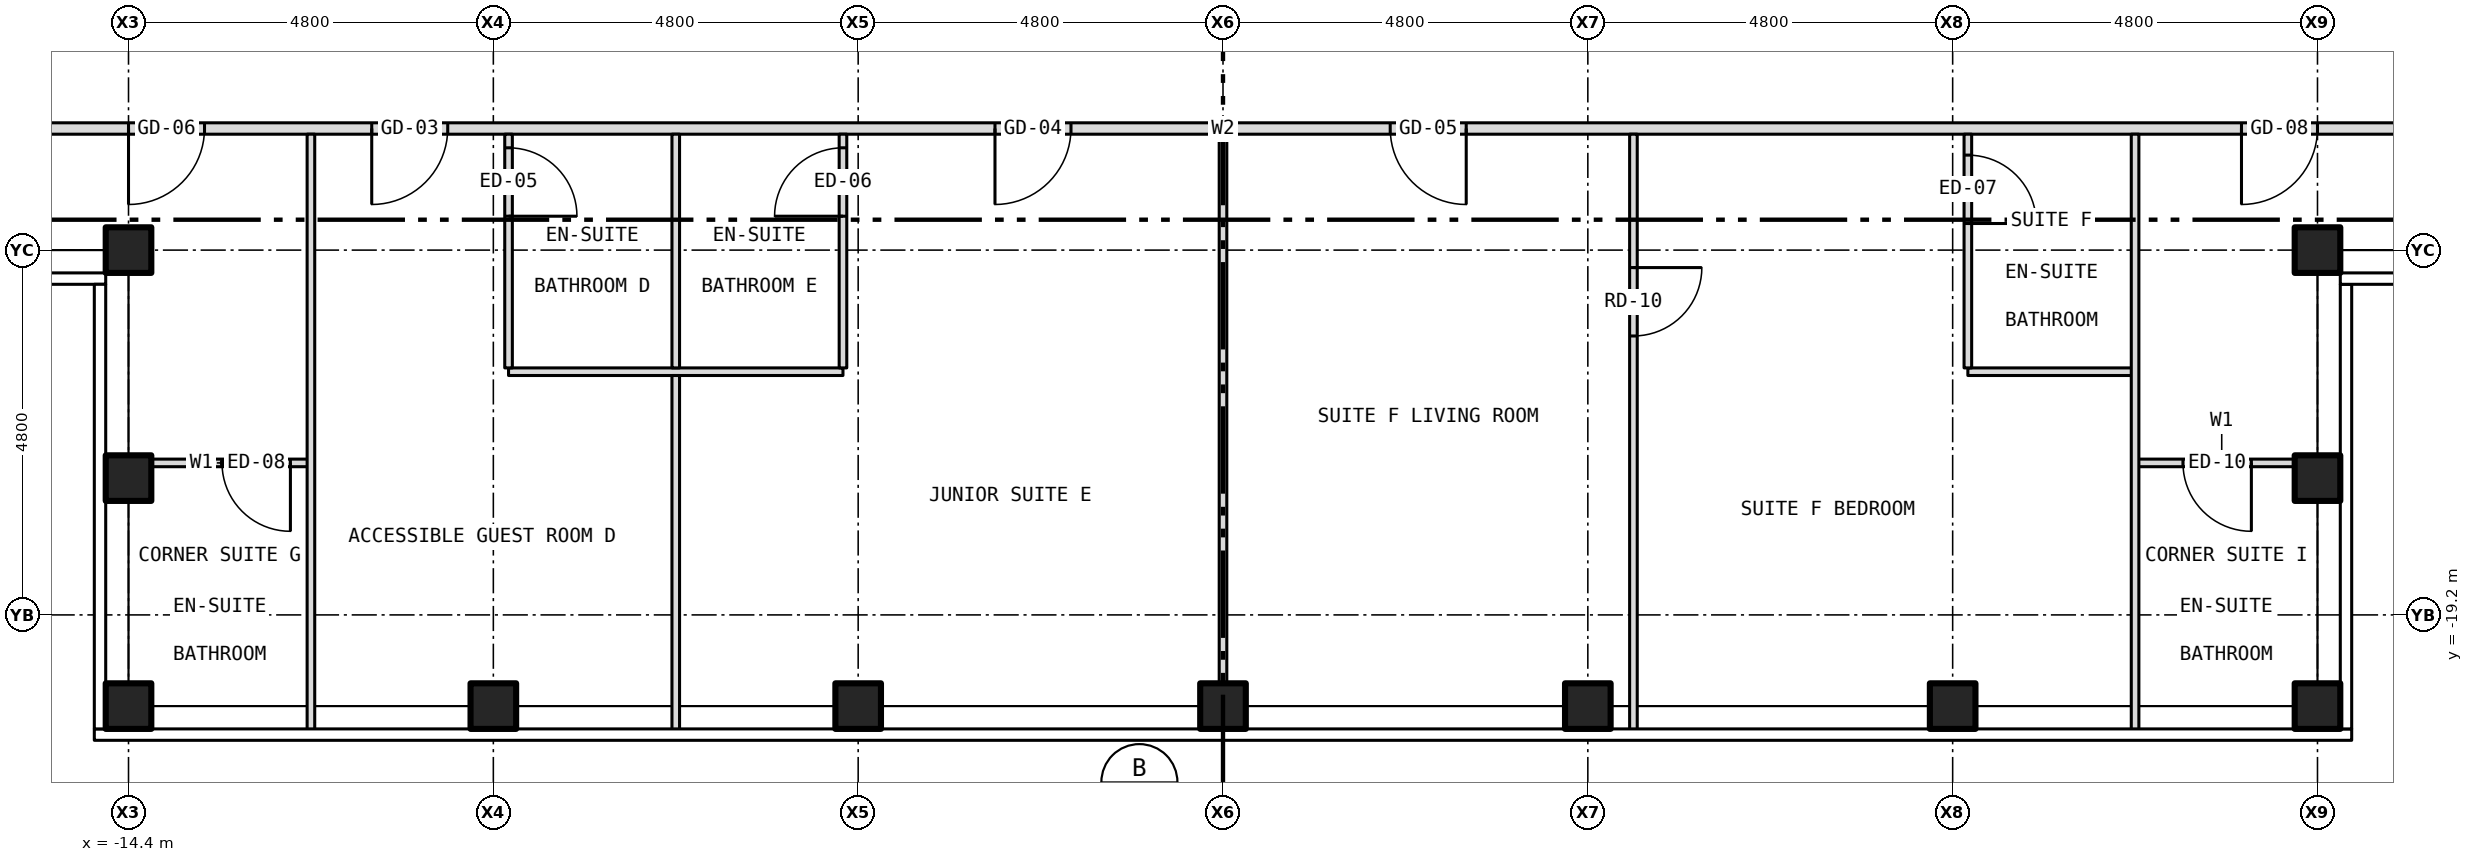
"""IFC4 building model, lengths in metres.
Left out: names, types, materials, properties, quantities, classifications, styles, units other than length and angle.
Written with IfcOpenShell. Run it as: python <this file> out.ifc"""

import sys

from ifc_helpers import new_model, si_unit, direction, frame, frame_2d, origin, origin_2d, place, context, subcontext, project, spatial, rectangle, hollow_rectangle, extrude, element, fill, save


model = new_model("IFC4")
c1 = context("Model", 3, precision=1e-05, world=origin(), true_north=direction((0.0, 1.0)))
c2 = subcontext(c1, "Body", "Model", "MODEL_VIEW")
j1 = project(units=[si_unit("LENGTHUNIT", "METRE"), si_unit("PLANEANGLEUNIT", "RADIAN")], contexts=[c1])
p1 = place(None, origin())
s1 = spatial("IfcSite", under=j1, at=p1, CompositionType="ELEMENT")
p2 = place(p1, origin())
s2 = spatial("IfcBuilding", under=s1, at=p2, CompositionType="ELEMENT")
p3 = place(p2, frame((0.0, 0.0, 244.5)))
s3 = spatial("IfcBuildingStorey", under=s2, at=p3, CompositionType="ELEMENT", Elevation=244.5)
for number, where, z_axis, x_axis in (
    (1, (-14.4, -20.4, -0.15), (0.0, 0.0, 1.0), (1.0, 0.0, 0.0)),
    (2, (-9.6, -20.4, -0.15), (0.0, 0.0, 1.0), (1.0, 0.0, 0.0)),
    (3, (-4.8, -20.4, -0.15), (0.0, 0.0, 1.0), (1.0, 0.0, 0.0)),
    (4, (0.0, -20.4, -0.15), (0.0, 0.0, 1.0), (1.0, 0.0, 0.0)),
    (5, (4.8, -20.4, -0.15), (0.0, 0.0, 1.0), (1.0, 0.0, 0.0)),
    (6, (9.6, -20.4, -0.15), (0.0, 0.0, 1.0), (1.0, 0.0, 0.0)),
    (7, (14.4, -20.4, -0.15), (0.0, 0.0, 1.0), (1.0, 0.0, 0.0)),
    (8, (-14.4, -14.4, -0.15), (0.0, 0.0, 1.0), (1.0, 0.0, 0.0)),
    (9, (-14.4, -17.4, -0.15), (0.0, 0.0, 1.0), (1.0, 0.0, 0.0)),
    (10, (14.4, -14.4, -0.15), (0.0, 0.0, 1.0), (1.0, 0.0, 0.0)),
    (11, (14.4, -17.4, -0.15), (0.0, 0.0, 1.0), (1.0, 0.0, 0.0)),
):
    element("IfcColumn", number, at=place(p3, frame(where, z_axis=z_axis, x_axis=x_axis)), inside=s3, PredefinedType="COLUMN", context=c2, shape_type="SweptSolid", body=[
        extrude(hollow_rectangle(XDim=0.6, YDim=0.6, WallThickness=0.03, at=origin_2d()), origin(), (0.0, 0.0, 1.0), 3.5),
    ])
p4 = place(p3, frame((-14.28, -17.2, 0.0), z_axis=(0.0, 0.0, 1.0), x_axis=(1.0, 0.0, 0.0)))
e12 = element("IfcWall", 12, at=p4, inside=s3, PredefinedType="PARTITIONING", context=c2, shape_type="SweptSolid", body=[
    extrude(rectangle(XDim=2.28, YDim=0.1, at=frame_2d((1.14, 0.0))), origin(), (0.0, 0.0, 1.0), 3.35),
])
p5 = place(p4, frame((1.11, 0.0, 0.0)))
e13 = element("IfcOpeningElement", 13, at=p5, cuts=e12, PredefinedType="OPENING", context=c2, shape_type="SweptSolid", body=[
    extrude(rectangle(XDim=0.9, YDim=2.1, at=frame_2d((0.45, 1.05))), frame((0.0, 0.062, 0.0), z_axis=(0.0, -1.0, 0.0), x_axis=(1.0, 0.0, 0.0)), (0.0, 0.0, 1.0), 0.124),
])
p6 = place(p3, frame((12.0, -17.2, 0.0), z_axis=(0.0, 0.0, 1.0), x_axis=(1.0, 0.0, 0.0)))
e14 = element("IfcWall", 14, at=p6, inside=s3, PredefinedType="PARTITIONING", context=c2, shape_type="SweptSolid", body=[
    extrude(rectangle(XDim=2.28, YDim=0.1, at=frame_2d((1.14, 0.0))), origin(), (0.0, 0.0, 1.0), 3.35),
])
p7 = place(p6, frame((0.63, 0.0, 0.0)))
e15 = element("IfcOpeningElement", 15, at=p7, cuts=e14, PredefinedType="OPENING", context=c2, shape_type="SweptSolid", body=[
    extrude(rectangle(XDim=0.9, YDim=2.1, at=frame_2d((0.45, 1.05))), frame((0.0, 0.062, 0.0), z_axis=(0.0, -1.0, 0.0), x_axis=(1.0, 0.0, 0.0)), (0.0, 0.0, 1.0), 0.124),
])
p8 = place(p3, frame((-9.4, -16.0, 0.0), z_axis=(0.0, 0.0, 1.0), x_axis=(1.0, 0.0, 0.0)))
e16 = element("IfcWall", 16, at=p8, inside=s3, PredefinedType="PARTITIONING", context=c2, shape_type="SweptSolid", body=[
    extrude(rectangle(XDim=4.4, YDim=0.1, at=frame_2d((2.2, 0.0))), origin(), (0.0, 0.0, 1.0), 3.35),
])
p9 = place(p3, frame((9.8, -16.0, 0.0), z_axis=(0.0, 0.0, 1.0), x_axis=(1.0, 0.0, 0.0)))
e17 = element("IfcWall", 17, at=p9, inside=s3, PredefinedType="PARTITIONING", context=c2, shape_type="SweptSolid", body=[
    extrude(rectangle(XDim=2.2, YDim=0.1, at=frame_2d((1.1, 0.0))), origin(), (0.0, 0.0, 1.0), 3.35),
])
p10 = place(p3, frame((-15.8, -12.8, 0.0), z_axis=(0.0, 0.0, 1.0), x_axis=(1.0, 0.0, 0.0)))
e18 = element("IfcWall", 18, at=p10, inside=s3, PredefinedType="PARTITIONING", context=c2, shape_type="SweptSolid", body=[
    extrude(rectangle(XDim=31.6, YDim=0.15, at=frame_2d((15.8, 0.0))), origin(), (0.0, 0.0, 1.0), 3.35),
])
p11 = place(p10, frame((4.6, 0.0, 0.0)))
e19 = element("IfcOpeningElement", 19, at=p11, cuts=e18, PredefinedType="OPENING", context=c2, shape_type="SweptSolid", body=[
    extrude(rectangle(XDim=1.0, YDim=2.1, at=frame_2d((0.5, 1.05))), frame((0.0, 0.087, 0.0), z_axis=(0.0, -1.0, 0.0), x_axis=(1.0, 0.0, 0.0)), (0.0, 0.0, 1.0), 0.174),
])
p12 = place(p10, frame((12.8, 0.0, 0.0)))
e20 = element("IfcOpeningElement", 20, at=p12, cuts=e18, PredefinedType="OPENING", context=c2, shape_type="SweptSolid", body=[
    extrude(rectangle(XDim=1.0, YDim=2.1, at=frame_2d((0.5, 1.05))), frame((0.0, 0.087, 0.0), z_axis=(0.0, -1.0, 0.0), x_axis=(1.0, 0.0, 0.0)), (0.0, 0.0, 1.0), 0.174),
])
p13 = place(p10, frame((18.0, 0.0, 0.0)))
e21 = element("IfcOpeningElement", 21, at=p13, cuts=e18, PredefinedType="OPENING", context=c2, shape_type="SweptSolid", body=[
    extrude(rectangle(XDim=1.0, YDim=2.1, at=frame_2d((0.5, 1.05))), frame((0.0, 0.087, 0.0), z_axis=(0.0, -1.0, 0.0), x_axis=(1.0, 0.0, 0.0)), (0.0, 0.0, 1.0), 0.174),
])
p14 = place(p10, frame((1.4, 0.0, 0.0)))
e22 = element("IfcOpeningElement", 22, at=p14, cuts=e18, PredefinedType="OPENING", context=c2, shape_type="SweptSolid", body=[
    extrude(rectangle(XDim=1.0, YDim=2.1, at=frame_2d((0.5, 1.05))), frame((0.0, 0.087, 0.0), z_axis=(0.0, -1.0, 0.0), x_axis=(1.0, 0.0, 0.0)), (0.0, 0.0, 1.0), 0.174),
])
p15 = place(p10, frame((29.2, 0.0, 0.0)))
e23 = element("IfcOpeningElement", 23, at=p15, cuts=e18, PredefinedType="OPENING", context=c2, shape_type="SweptSolid", body=[
    extrude(rectangle(XDim=1.0, YDim=2.1, at=frame_2d((0.5, 1.05))), frame((0.0, 0.087, 0.0), z_axis=(0.0, -1.0, 0.0), x_axis=(1.0, 0.0, 0.0)), (0.0, 0.0, 1.0), 0.174),
])
p16 = place(p3, frame((-12.0, -20.73, 0.0), z_axis=(0.0, 0.0, 1.0), x_axis=(0.0, 1.0, 0.0)))
e24 = element("IfcWall", 24, at=p16, inside=s3, PredefinedType="PARTITIONING", context=c2, shape_type="SweptSolid", body=[
    extrude(rectangle(XDim=7.855, YDim=0.1, at=frame_2d((3.927, 0.0))), origin(), (0.0, 0.0, 1.0), 3.35),
])
p17 = place(p3, frame((-9.4, -15.95, 0.0), z_axis=(0.0, 0.0, 1.0), x_axis=(0.0, 1.0, 0.0)))
e25 = element("IfcWall", 25, at=p17, inside=s3, PredefinedType="PARTITIONING", context=c2, shape_type="SweptSolid", body=[
    extrude(rectangle(XDim=3.075, YDim=0.1, at=frame_2d((1.538, 0.0))), origin(), (0.0, 0.0, 1.0), 2.728),
])
p18 = place(p17, frame((1.996, 0.0, 0.0)))
e26 = element("IfcOpeningElement", 26, at=p18, cuts=e25, PredefinedType="OPENING", context=c2, shape_type="SweptSolid", body=[
    extrude(rectangle(XDim=0.9, YDim=2.1, at=frame_2d((0.45, 1.05))), frame((0.0, 0.062, 0.0), z_axis=(0.0, -1.0, 0.0), x_axis=(1.0, 0.0, 0.0)), (0.0, 0.0, 1.0), 0.124),
])
p19 = place(p3, frame((-7.2, -20.73, 0.0), z_axis=(0.0, 0.0, 1.0), x_axis=(0.0, 1.0, 0.0)))
e27 = element("IfcWall", 27, at=p19, inside=s3, PredefinedType="PARTITIONING", context=c2, shape_type="SweptSolid", body=[
    extrude(rectangle(XDim=4.68, YDim=0.1, at=frame_2d((2.34, 0.0))), origin(), (0.0, 0.0, 1.0), 3.35),
])
p20 = place(p3, frame((-7.2, -15.95, 0.0), z_axis=(0.0, 0.0, 1.0), x_axis=(0.0, 1.0, 0.0)))
e28 = element("IfcWall", 28, at=p20, inside=s3, PredefinedType="PARTITIONING", context=c2, shape_type="SweptSolid", body=[
    extrude(rectangle(XDim=3.075, YDim=0.1, at=frame_2d((1.538, 0.0))), origin(), (0.0, 0.0, 1.0), 3.35),
])
p21 = place(p3, frame((-5.0, -15.95, 0.0), z_axis=(0.0, 0.0, 1.0), x_axis=(0.0, 1.0, 0.0)))
e29 = element("IfcWall", 29, at=p21, inside=s3, PredefinedType="PARTITIONING", context=c2, shape_type="SweptSolid", body=[
    extrude(rectangle(XDim=3.075, YDim=0.1, at=frame_2d((1.538, 0.0))), origin(), (0.0, 0.0, 1.0), 3.35),
])
p22 = place(p21, frame((1.996, 0.0, 0.0)))
e30 = element("IfcOpeningElement", 30, at=p22, cuts=e29, PredefinedType="OPENING", context=c2, shape_type="SweptSolid", body=[
    extrude(rectangle(XDim=0.9, YDim=2.1, at=frame_2d((0.45, 1.05))), frame((0.0, 0.062, 0.0), z_axis=(0.0, -1.0, 0.0), x_axis=(1.0, 0.0, 0.0)), (0.0, 0.0, 1.0), 0.124),
])
p23 = place(p3, frame((0.0, -20.28, 0.0), z_axis=(0.0, 0.0, 1.0), x_axis=(0.0, 1.0, 0.0)))
e31 = element("IfcWall", 31, at=p23, inside=s3, PredefinedType="PARTITIONING", context=c2, shape_type="SweptSolid", body=[
    extrude(rectangle(XDim=7.405, YDim=0.1, at=frame_2d((3.703, 0.0))), origin(), (0.0, 0.0, 1.0), 2.728),
])
p24 = place(p3, frame((5.4, -20.73, 0.0), z_axis=(0.0, 0.0, 1.0), x_axis=(0.0, 1.0, 0.0)))
e32 = element("IfcWall", 32, at=p24, inside=s3, PredefinedType="PARTITIONING", context=c2, shape_type="SweptSolid", body=[
    extrude(rectangle(XDim=7.855, YDim=0.1, at=frame_2d((3.927, 0.0))), origin(), (0.0, 0.0, 1.0), 3.35),
])
p25 = place(p24, frame((5.2, 0.0, 0.0)))
e33 = element("IfcOpeningElement", 33, at=p25, cuts=e32, PredefinedType="OPENING", context=c2, shape_type="SweptSolid", body=[
    extrude(rectangle(XDim=0.9, YDim=2.1, at=frame_2d((0.45, 1.05))), frame((0.0, 0.062, 0.0), z_axis=(0.0, -1.0, 0.0), x_axis=(1.0, 0.0, 0.0)), (0.0, 0.0, 1.0), 0.124),
])
p26 = place(p3, frame((9.8, -15.95, 0.0), z_axis=(0.0, 0.0, 1.0), x_axis=(0.0, 1.0, 0.0)))
e34 = element("IfcWall", 34, at=p26, inside=s3, PredefinedType="PARTITIONING", context=c2, shape_type="SweptSolid", body=[
    extrude(rectangle(XDim=3.075, YDim=0.1, at=frame_2d((1.538, 0.0))), origin(), (0.0, 0.0, 1.0), 2.728),
])
p27 = place(p26, frame((1.9, 0.0, 0.0)))
e35 = element("IfcOpeningElement", 35, at=p27, cuts=e34, PredefinedType="OPENING", context=c2, shape_type="SweptSolid", body=[
    extrude(rectangle(XDim=0.9, YDim=2.1, at=frame_2d((0.45, 1.05))), frame((0.0, 0.062, 0.0), z_axis=(0.0, -1.0, 0.0), x_axis=(1.0, 0.0, 0.0)), (0.0, 0.0, 1.0), 0.124),
])
p28 = place(p3, frame((12.0, -20.73, 0.0), z_axis=(0.0, 0.0, 1.0), x_axis=(0.0, 1.0, 0.0)))
e36 = element("IfcWall", 36, at=p28, inside=s3, PredefinedType="PARTITIONING", context=c2, shape_type="SweptSolid", body=[
    extrude(rectangle(XDim=7.855, YDim=0.1, at=frame_2d((3.927, 0.0))), origin(), (0.0, 0.0, 1.0), 3.35),
])
p29 = place(p11, origin())
e37 = element("IfcDoor", 37, at=p29, inside=s3, OperationType="SINGLE_SWING_LEFT", PredefinedType="DOOR", context=c2, shape_type="SweptSolid", body=[
    extrude(rectangle(XDim=1.0, YDim=2.1, at=frame_2d((0.5, 1.05))), frame((0.0, 0.025, 0.0), z_axis=(0.0, -1.0, 0.0), x_axis=(1.0, 0.0, 0.0)), (0.0, 0.0, 1.0), 0.05),
])
fill(e19, e37)
p30 = place(p18, origin())
e38 = element("IfcDoor", 38, at=p30, inside=s3, OperationType="SINGLE_SWING_LEFT", PredefinedType="DOOR", context=c2, shape_type="SweptSolid", body=[
    extrude(rectangle(XDim=0.9, YDim=2.1, at=frame_2d((0.45, 1.05))), frame((0.0, 0.025, 0.0), z_axis=(0.0, -1.0, 0.0), x_axis=(1.0, 0.0, 0.0)), (0.0, 0.0, 1.0), 0.05),
])
fill(e26, e38)
p31 = place(p12, origin())
e39 = element("IfcDoor", 39, at=p31, inside=s3, OperationType="SINGLE_SWING_LEFT", PredefinedType="DOOR", context=c2, shape_type="SweptSolid", body=[
    extrude(rectangle(XDim=1.0, YDim=2.1, at=frame_2d((0.5, 1.05))), frame((0.0, 0.025, 0.0), z_axis=(0.0, -1.0, 0.0), x_axis=(1.0, 0.0, 0.0)), (0.0, 0.0, 1.0), 0.05),
])
fill(e20, e39)
p32 = place(p22, origin())
e40 = element("IfcDoor", 40, at=p32, inside=s3, OperationType="SINGLE_SWING_LEFT", PredefinedType="DOOR", context=c2, shape_type="SweptSolid", body=[
    extrude(rectangle(XDim=0.9, YDim=2.1, at=frame_2d((0.45, 1.05))), frame((0.0, 0.025, 0.0), z_axis=(0.0, -1.0, 0.0), x_axis=(1.0, 0.0, 0.0)), (0.0, 0.0, 1.0), 0.05),
])
fill(e30, e40)
p33 = place(p13, origin())
e41 = element("IfcDoor", 41, at=p33, inside=s3, OperationType="SINGLE_SWING_RIGHT", PredefinedType="DOOR", context=c2, shape_type="SweptSolid", body=[
    extrude(rectangle(XDim=1.0, YDim=2.1, at=frame_2d((0.5, 1.05))), frame((0.0, 0.025, 0.0), z_axis=(0.0, -1.0, 0.0), x_axis=(1.0, 0.0, 0.0)), (0.0, 0.0, 1.0), 0.05),
])
fill(e21, e41)
p34 = place(p25, origin())
e42 = element("IfcDoor", 42, at=p34, inside=s3, OperationType="SINGLE_SWING_RIGHT", PredefinedType="DOOR", context=c2, shape_type="SweptSolid", body=[
    extrude(rectangle(XDim=0.9, YDim=2.1, at=frame_2d((0.45, 1.05))), frame((0.0, 0.025, 0.0), z_axis=(0.0, -1.0, 0.0), x_axis=(1.0, 0.0, 0.0)), (0.0, 0.0, 1.0), 0.05),
])
fill(e33, e42)
p35 = place(p27, origin())
e43 = element("IfcDoor", 43, at=p35, inside=s3, OperationType="SINGLE_SWING_LEFT", PredefinedType="DOOR", context=c2, shape_type="SweptSolid", body=[
    extrude(rectangle(XDim=0.9, YDim=2.1, at=frame_2d((0.45, 1.05))), frame((0.0, 0.025, 0.0), z_axis=(0.0, -1.0, 0.0), x_axis=(1.0, 0.0, 0.0)), (0.0, 0.0, 1.0), 0.05),
])
fill(e35, e43)
p36 = place(p5, origin())
e44 = element("IfcDoor", 44, at=p36, inside=s3, OperationType="SINGLE_SWING_RIGHT", PredefinedType="DOOR", context=c2, shape_type="SweptSolid", body=[
    extrude(rectangle(XDim=0.9, YDim=2.1, at=frame_2d((0.45, 1.05))), frame((0.0, 0.025, 0.0), z_axis=(0.0, -1.0, 0.0), x_axis=(1.0, 0.0, 0.0)), (0.0, 0.0, 1.0), 0.05),
])
fill(e13, e44)
p37 = place(p14, origin())
e45 = element("IfcDoor", 45, at=p37, inside=s3, OperationType="SINGLE_SWING_LEFT", PredefinedType="DOOR", context=c2, shape_type="SweptSolid", body=[
    extrude(rectangle(XDim=1.0, YDim=2.1, at=frame_2d((0.5, 1.05))), frame((0.0, 0.025, 0.0), z_axis=(0.0, -1.0, 0.0), x_axis=(1.0, 0.0, 0.0)), (0.0, 0.0, 1.0), 0.05),
])
fill(e22, e45)
p38 = place(p7, origin())
e46 = element("IfcDoor", 46, at=p38, inside=s3, OperationType="SINGLE_SWING_RIGHT", PredefinedType="DOOR", context=c2, shape_type="SweptSolid", body=[
    extrude(rectangle(XDim=0.9, YDim=2.1, at=frame_2d((0.45, 1.05))), frame((0.0, 0.025, 0.0), z_axis=(0.0, -1.0, 0.0), x_axis=(1.0, 0.0, 0.0)), (0.0, 0.0, 1.0), 0.05),
])
fill(e15, e46)
p39 = place(p15, origin())
e47 = element("IfcDoor", 47, at=p39, inside=s3, OperationType="SINGLE_SWING_LEFT", PredefinedType="DOOR", context=c2, shape_type="SweptSolid", body=[
    extrude(rectangle(XDim=1.0, YDim=2.1, at=frame_2d((0.5, 1.05))), frame((0.0, 0.025, 0.0), z_axis=(0.0, -1.0, 0.0), x_axis=(1.0, 0.0, 0.0)), (0.0, 0.0, 1.0), 0.05),
])
fill(e23, e47)
save(model, sys.argv[1])
